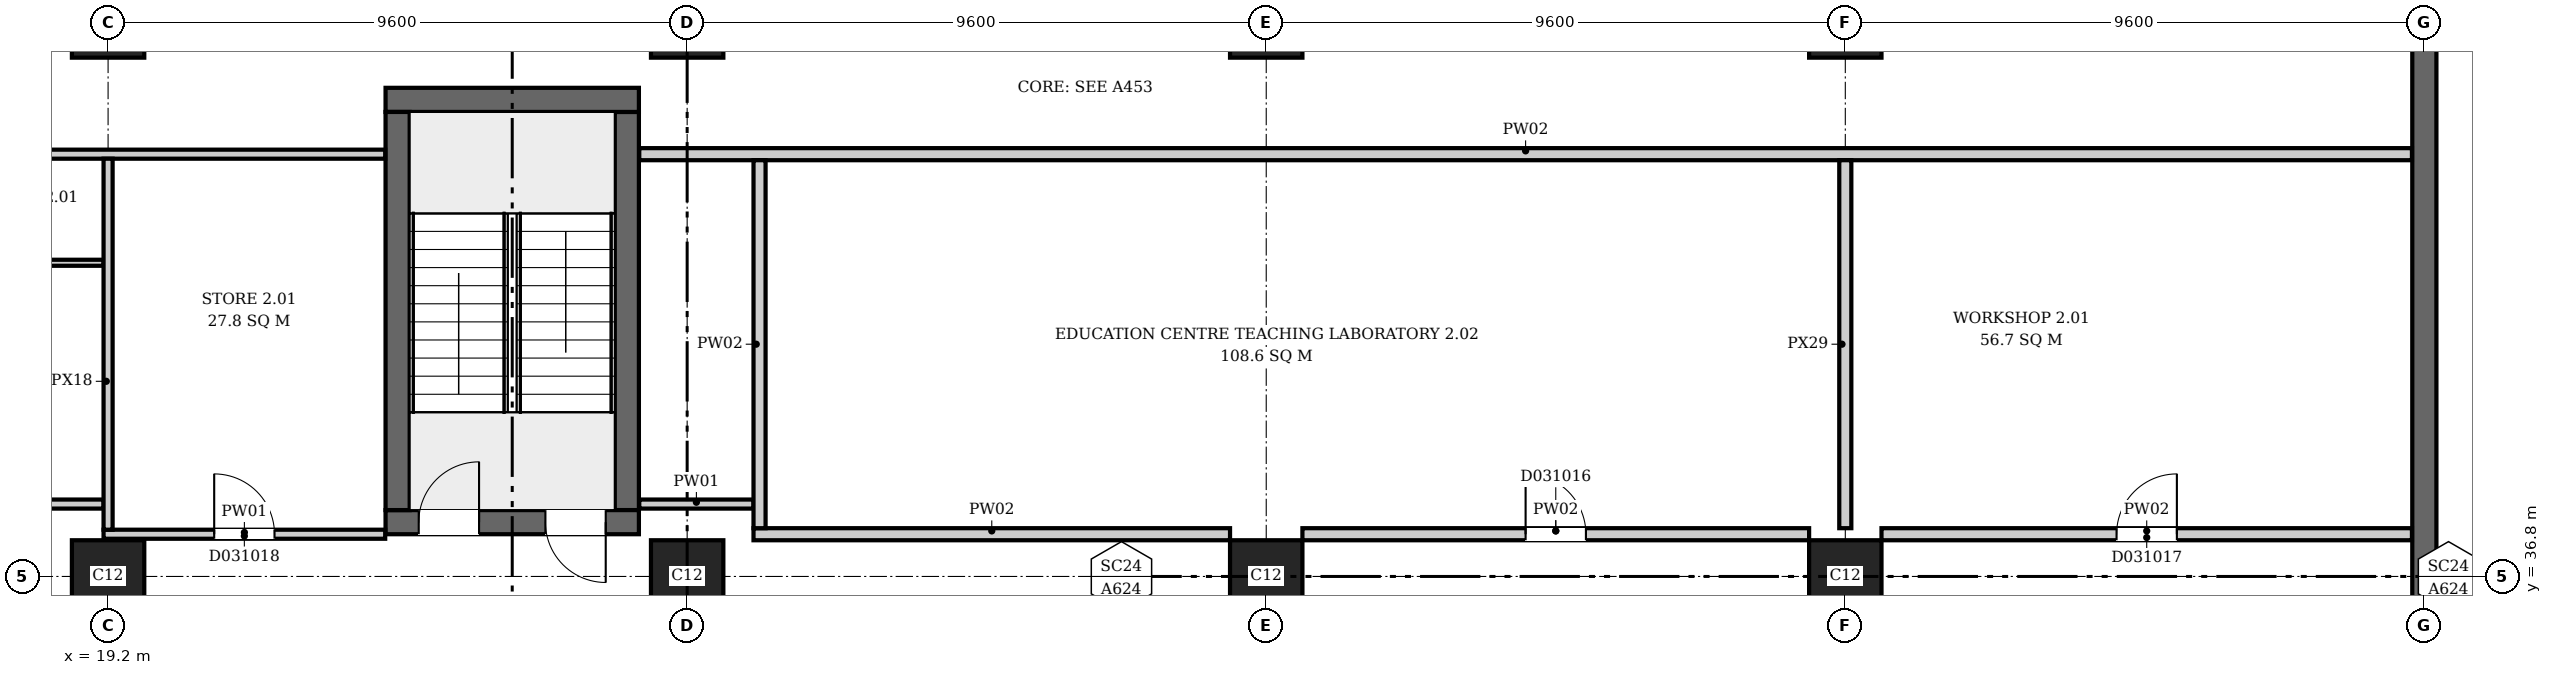
"""IFC4 building model, lengths in metres.
Left out: names, types, materials, properties, quantities, classifications, styles, units other than length and angle.
Written with IfcOpenShell. Run it as: python <this file> out.ifc"""

import sys

from ifc_helpers import new_model, si_unit, direction, frame, frame_2d, origin, origin_2d, place, context, subcontext, project, spatial, rectangle, extrude, element, fill, save


model = new_model("IFC4")
c1 = context("Model", 3, precision=1e-05, world=origin(), true_north=direction((0.0, 1.0)))
c2 = subcontext(c1, "Body", "Model", "MODEL_VIEW")
j1 = project(units=[si_unit("LENGTHUNIT", "METRE"), si_unit("PLANEANGLEUNIT", "RADIAN")], contexts=[c1])
p1 = place(None, origin())
s1 = spatial("IfcSite", under=j1, at=p1, CompositionType="ELEMENT")
p2 = place(p1, origin())
s2 = spatial("IfcBuilding", under=s1, at=p2, CompositionType="ELEMENT")
p3 = place(p2, frame((0.0, 0.0, 14.2)))
s3 = spatial("IfcBuildingStorey", under=s2, at=p3, CompositionType="ELEMENT", Elevation=14.2)
p4 = place(p3, frame((57.6, -0.2, 0.0), z_axis=(0.0, 0.0, 1.0), x_axis=(0.0, 1.0, 0.0)))
e1 = element("IfcWall", 1, at=p4, inside=s3, PredefinedType="SHEAR", context=c2, shape_type="SweptSolid", body=[
    extrude(rectangle(XDim=46.88, YDim=0.4, at=frame_2d((23.44, 0.0))), origin(), (0.0, 0.0, 1.0), 7.5),
])
p5 = place(p3, frame((23.8, 37.7, 0.0), z_axis=(0.0, 0.0, 1.0), x_axis=(1.0, 0.0, 0.0)))
e2 = element("IfcWall", 2, at=p5, inside=s3, PredefinedType="SHEAR", context=c2, shape_type="SweptSolid", body=[
    extrude(rectangle(XDim=4.2, YDim=0.4, at=frame_2d((2.1, 0.0))), origin(), (0.0, 0.0, 1.0), 7.5),
])
p6 = place(p5, frame((0.55, 0.0, 0.0)))
e3 = element("IfcOpeningElement", 3, at=p6, cuts=e2, PredefinedType="OPENING", context=c2, shape_type="SweptSolid", body=[
    extrude(rectangle(XDim=1.0, YDim=2.1, at=frame_2d((0.5, 1.05))), frame((0.0, 0.21, 0.0), z_axis=(0.0, -1.0, 0.0), x_axis=(1.0, 0.0, 0.0)), (0.0, 0.0, 1.0), 0.42),
])
p7 = place(p5, frame((2.65, 0.0, 0.0)))
e4 = element("IfcOpeningElement", 4, at=p7, cuts=e2, PredefinedType="OPENING", context=c2, shape_type="SweptSolid", body=[
    extrude(rectangle(XDim=1.0, YDim=2.1, at=frame_2d((0.5, 1.05))), frame((0.0, 0.21, 0.0), z_axis=(0.0, -1.0, 0.0), x_axis=(1.0, 0.0, 0.0)), (0.0, 0.0, 1.0), 0.42),
])
p8 = place(p3, frame((23.8, 44.7, 0.0), z_axis=(0.0, 0.0, 1.0), x_axis=(1.0, 0.0, 0.0)))
e5 = element("IfcWall", 5, at=p8, inside=s3, PredefinedType="SHEAR", context=c2, shape_type="SweptSolid", body=[
    extrude(rectangle(XDim=4.2, YDim=0.4, at=frame_2d((2.1, 0.0))), origin(), (0.0, 0.0, 1.0), 7.5),
])
for number, where, z_axis, x_axis in (
    (6, (24.0, 37.9, 0.0), (0.0, 0.0, 1.0), (0.0, 1.0, 0.0)),
    (7, (27.8, 37.9, 0.0), (0.0, 0.0, 1.0), (0.0, 1.0, 0.0)),
):
    element("IfcWall", number, at=place(p3, frame(where, z_axis=z_axis, x_axis=x_axis)), inside=s3, PredefinedType="SHEAR", context=c2, shape_type="SweptSolid", body=[
        extrude(rectangle(XDim=6.6, YDim=0.4, at=frame_2d((3.3, 0.0))), origin(), (0.0, 0.0, 1.0), 7.5),
    ])
for number, where, z_axis, x_axis in (
    (8, (19.2, 36.8, 0.0), (0.0, 0.0, 1.0), (1.0, 0.0, 0.0)),
    (9, (28.8, 36.8, 0.0), (0.0, 0.0, 1.0), (1.0, 0.0, 0.0)),
    (10, (38.4, 36.8, 0.0), (0.0, 0.0, 1.0), (1.0, 0.0, 0.0)),
    (11, (48.0, 36.8, 0.0), (0.0, 0.0, 1.0), (1.0, 0.0, 0.0)),
    (12, (19.2, 46.0, 0.0), (0.0, 0.0, 1.0), (1.0, 0.0, 0.0)),
    (13, (28.8, 46.0, 0.0), (0.0, 0.0, 1.0), (1.0, 0.0, 0.0)),
    (14, (38.4, 46.0, 0.0), (0.0, 0.0, 1.0), (1.0, 0.0, 0.0)),
    (15, (48.0, 46.0, 0.0), (0.0, 0.0, 1.0), (1.0, 0.0, 0.0)),
):
    element("IfcColumn", number, at=place(p3, frame(where, z_axis=z_axis, x_axis=x_axis)), inside=s3, PredefinedType="COLUMN", context=c2, shape_type="SweptSolid", body=[
        extrude(rectangle(XDim=1.2, YDim=1.2, at=origin_2d()), origin(), (0.0, 0.0, 1.0), 7.5),
    ])
p9 = place(p3, frame((8.906, 38.0, 0.0), z_axis=(0.0, 0.0, 1.0), x_axis=(1.0, 0.0, 0.0)))
e16 = element("IfcWall", 16, at=p9, inside=s3, PredefinedType="PARTITIONING", context=c2, shape_type="SweptSolid", body=[
    extrude(rectangle(XDim=10.219, YDim=0.15, at=frame_2d((5.109, 0.0))), origin(), (0.0, 0.0, 1.0), 7.15),
])
p10 = place(p9, frame((2.62, 0.0, 0.0)))
e17 = element("IfcOpeningElement", 17, at=p10, cuts=e16, PredefinedType="OPENING", context=c2, shape_type="SweptSolid", body=[
    extrude(rectangle(XDim=1.0, YDim=2.1, at=frame_2d((0.5, 1.05))), frame((0.0, 0.085, 0.0), z_axis=(0.0, -1.0, 0.0), x_axis=(1.0, 0.0, 0.0)), (0.0, 0.0, 1.0), 0.17),
])
p11 = place(p9, frame((7.584, 0.0, 0.0)))
e18 = element("IfcOpeningElement", 18, at=p11, cuts=e16, PredefinedType="OPENING", context=c2, shape_type="SweptSolid", body=[
    extrude(rectangle(XDim=1.0, YDim=2.1, at=frame_2d((0.5, 1.05))), frame((0.0, 0.085, 0.0), z_axis=(0.0, -1.0, 0.0), x_axis=(1.0, 0.0, 0.0)), (0.0, 0.0, 1.0), 0.17),
])
p12 = place(p3, frame((8.906, 43.8, 0.0), z_axis=(0.0, 0.0, 1.0), x_axis=(1.0, 0.0, 0.0)))
e19 = element("IfcWall", 19, at=p12, inside=s3, PredefinedType="PARTITIONING", context=c2, shape_type="SweptSolid", body=[
    extrude(rectangle(XDim=14.888, YDim=0.15, at=frame_2d((7.444, 0.0))), origin(), (0.0, 0.0, 1.0), 7.15),
])
p13 = place(p12, frame((7.694, 0.0, 0.0)))
e20 = element("IfcOpeningElement", 20, at=p13, cuts=e19, PredefinedType="OPENING", context=c2, shape_type="SweptSolid", body=[
    extrude(rectangle(XDim=1.0, YDim=2.1, at=frame_2d((0.5, 1.05))), frame((0.0, 0.085, 0.0), z_axis=(0.0, -1.0, 0.0), x_axis=(1.0, 0.0, 0.0)), (0.0, 0.0, 1.0), 0.17),
])
p14 = place(p3, frame((15.05, 42.0, 0.0), z_axis=(0.0, 0.0, 1.0), x_axis=(1.0, 0.0, 0.0)))
e21 = element("IfcWall", 21, at=p14, inside=s3, PredefinedType="PARTITIONING", context=c2, shape_type="SweptSolid", body=[
    extrude(rectangle(XDim=4.075, YDim=0.1, at=frame_2d((2.038, 0.0))), origin(), (0.0, 0.0, 1.0), 7.15),
])
p15 = place(p3, frame((19.125, 37.5, 0.0), z_axis=(0.0, 0.0, 1.0), x_axis=(1.0, 0.0, 0.0)))
e22 = element("IfcWall", 22, at=p15, inside=s3, PredefinedType="PARTITIONING", context=c2, shape_type="SweptSolid", body=[
    extrude(rectangle(XDim=4.669, YDim=0.15, at=frame_2d((2.334, 0.0))), origin(), (0.0, 0.0, 1.0), 7.15),
])
p16 = place(p15, frame((1.834, 0.0, 0.0)))
e23 = element("IfcOpeningElement", 23, at=p16, cuts=e22, PredefinedType="OPENING", context=c2, shape_type="SweptSolid", body=[
    extrude(rectangle(XDim=1.0, YDim=2.1, at=frame_2d((0.5, 1.05))), frame((0.0, 0.085, 0.0), z_axis=(0.0, -1.0, 0.0), x_axis=(1.0, 0.0, 0.0)), (0.0, 0.0, 1.0), 0.17),
])
p17 = place(p3, frame((19.2, 37.575, 0.0), z_axis=(0.0, 0.0, 1.0), x_axis=(0.0, 1.0, 0.0)))
e24 = element("IfcWall", 24, at=p17, inside=s3, PredefinedType="PARTITIONING", context=c2, shape_type="SweptSolid", body=[
    extrude(rectangle(XDim=6.15, YDim=0.15, at=frame_2d((3.075, 0.0))), origin(), (0.0, 0.0, 1.0), 6.75),
])
p18 = place(p3, frame((28.006, 38.0, 0.0), z_axis=(0.0, 0.0, 1.0), x_axis=(1.0, 0.0, 0.0)))
e25 = element("IfcWall", 25, at=p18, inside=s3, PredefinedType="PARTITIONING", context=c2, shape_type="SweptSolid", body=[
    extrude(rectangle(XDim=1.894, YDim=0.15, at=frame_2d((0.947, 0.0))), origin(), (0.0, 0.0, 1.0), 7.15),
])
p19 = place(p3, frame((28.006, 43.8, 0.0), z_axis=(0.0, 0.0, 1.0), x_axis=(1.0, 0.0, 0.0)))
e26 = element("IfcWall", 26, at=p19, inside=s3, PredefinedType="PARTITIONING", context=c2, shape_type="SweptSolid", body=[
    extrude(rectangle(XDim=29.388, YDim=0.2, at=frame_2d((14.694, 0.0))), origin(), (0.0, 0.0, 1.0), 7.15),
])
p20 = place(p3, frame((29.9, 37.5, 0.0), z_axis=(0.0, 0.0, 1.0), x_axis=(1.0, 0.0, 0.0)))
e27 = element("IfcWall", 27, at=p20, inside=s3, PredefinedType="PARTITIONING", context=c2, shape_type="SweptSolid", body=[
    extrude(rectangle(XDim=7.9, YDim=0.2, at=frame_2d((3.95, 0.0))), origin(), (0.0, 0.0, 1.0), 7.15),
])
p21 = place(p3, frame((30.0, 37.6, 0.0), z_axis=(0.0, 0.0, 1.0), x_axis=(0.0, 1.0, 0.0)))
e28 = element("IfcWall", 28, at=p21, inside=s3, PredefinedType="PARTITIONING", context=c2, shape_type="SweptSolid", body=[
    extrude(rectangle(XDim=6.1, YDim=0.2, at=frame_2d((3.05, 0.0))), origin(), (0.0, 0.0, 1.0), 7.15),
])
p22 = place(p3, frame((39.0, 37.5, 0.0), z_axis=(0.0, 0.0, 1.0), x_axis=(1.0, 0.0, 0.0)))
e29 = element("IfcWall", 29, at=p22, inside=s3, PredefinedType="PARTITIONING", context=c2, shape_type="SweptSolid", body=[
    extrude(rectangle(XDim=8.4, YDim=0.2, at=frame_2d((4.2, 0.0))), origin(), (0.0, 0.0, 1.0), 7.15),
])
p23 = place(p22, frame((3.7, 0.0, 0.0)))
e30 = element("IfcOpeningElement", 30, at=p23, cuts=e29, PredefinedType="OPENING", context=c2, shape_type="SweptSolid", body=[
    extrude(rectangle(XDim=1.0, YDim=2.1, at=frame_2d((0.5, 1.05))), frame((0.0, 0.11, 0.0), z_axis=(0.0, -1.0, 0.0), x_axis=(1.0, 0.0, 0.0)), (0.0, 0.0, 1.0), 0.22),
])
p24 = place(p3, frame((48.0, 37.6, 0.0), z_axis=(0.0, 0.0, 1.0), x_axis=(0.0, 1.0, 0.0)))
e31 = element("IfcWall", 31, at=p24, inside=s3, PredefinedType="PARTITIONING", context=c2, shape_type="SweptSolid", body=[
    extrude(rectangle(XDim=6.1, YDim=0.2, at=frame_2d((3.05, 0.0))), origin(), (0.0, 0.0, 1.0), 6.75),
])
p25 = place(p3, frame((48.6, 37.5, 0.0), z_axis=(0.0, 0.0, 1.0), x_axis=(1.0, 0.0, 0.0)))
e32 = element("IfcWall", 32, at=p25, inside=s3, PredefinedType="PARTITIONING", context=c2, shape_type="SweptSolid", body=[
    extrude(rectangle(XDim=8.794, YDim=0.2, at=frame_2d((4.397, 0.0))), origin(), (0.0, 0.0, 1.0), 7.15),
])
p26 = place(p25, frame((3.897, 0.0, 0.0)))
e33 = element("IfcOpeningElement", 33, at=p26, cuts=e32, PredefinedType="OPENING", context=c2, shape_type="SweptSolid", body=[
    extrude(rectangle(XDim=1.0, YDim=2.1, at=frame_2d((0.5, 1.05))), frame((0.0, 0.11, 0.0), z_axis=(0.0, -1.0, 0.0), x_axis=(1.0, 0.0, 0.0)), (0.0, 0.0, 1.0), 0.22),
])
p27 = place(p6, origin())
e34 = element("IfcDoor", 34, at=p27, inside=s3, OperationType="SINGLE_SWING_RIGHT", PredefinedType="DOOR", context=c2, shape_type="SweptSolid", body=[
    extrude(rectangle(XDim=1.0, YDim=2.1, at=frame_2d((0.5, 1.05))), frame((0.0, 0.025, 0.0), z_axis=(0.0, -1.0, 0.0), x_axis=(1.0, 0.0, 0.0)), (0.0, 0.0, 1.0), 0.05),
])
fill(e3, e34)
p28 = place(p7, origin())
e35 = element("IfcDoor", 35, at=p28, inside=s3, OperationType="SINGLE_SWING_LEFT", PredefinedType="DOOR", context=c2, shape_type="SweptSolid", body=[
    extrude(rectangle(XDim=1.0, YDim=2.1, at=frame_2d((0.5, 1.05))), frame((0.0, 0.025, 0.0), z_axis=(0.0, -1.0, 0.0), x_axis=(1.0, 0.0, 0.0)), (0.0, 0.0, 1.0), 0.05),
])
fill(e4, e35)
p29 = place(p23, origin())
e36 = element("IfcDoor", 36, at=p29, inside=s3, OperationType="SINGLE_SWING_LEFT", PredefinedType="DOOR", context=c2, shape_type="SweptSolid", body=[
    extrude(rectangle(XDim=1.0, YDim=2.1, at=frame_2d((0.5, 1.05))), frame((0.0, 0.025, 0.0), z_axis=(0.0, -1.0, 0.0), x_axis=(1.0, 0.0, 0.0)), (0.0, 0.0, 1.0), 0.05),
])
fill(e30, e36)
p30 = place(p26, origin())
e37 = element("IfcDoor", 37, at=p30, inside=s3, OperationType="SINGLE_SWING_RIGHT", PredefinedType="DOOR", context=c2, shape_type="SweptSolid", body=[
    extrude(rectangle(XDim=1.0, YDim=2.1, at=frame_2d((0.5, 1.05))), frame((0.0, 0.025, 0.0), z_axis=(0.0, -1.0, 0.0), x_axis=(1.0, 0.0, 0.0)), (0.0, 0.0, 1.0), 0.05),
])
fill(e33, e37)
p31 = place(p16, origin())
e38 = element("IfcDoor", 38, at=p31, inside=s3, OperationType="SINGLE_SWING_LEFT", PredefinedType="DOOR", context=c2, shape_type="SweptSolid", body=[
    extrude(rectangle(XDim=1.0, YDim=2.1, at=frame_2d((0.5, 1.05))), frame((0.0, 0.025, 0.0), z_axis=(0.0, -1.0, 0.0), x_axis=(1.0, 0.0, 0.0)), (0.0, 0.0, 1.0), 0.05),
])
fill(e23, e38)
save(model, sys.argv[1])
